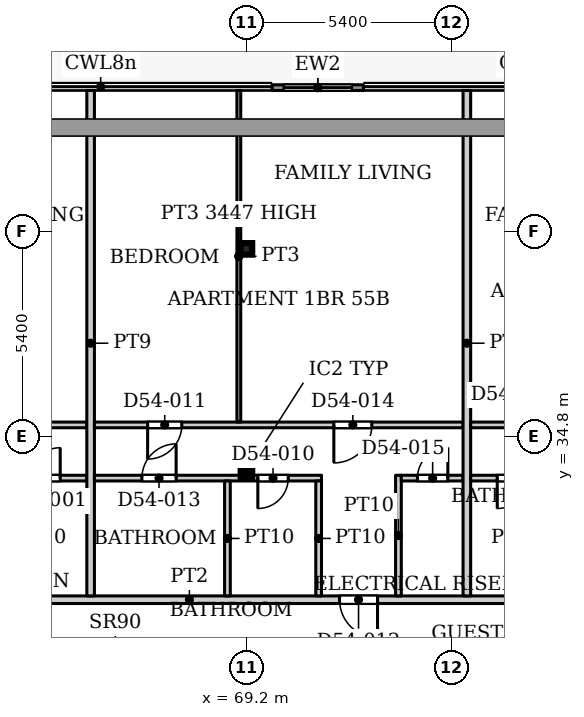
"""IFC4 building model, lengths in metres.
Left out: names, types, materials, properties, quantities, classifications, styles, units other than length and angle.
Written with IfcOpenShell. Run it as: python <this file> out.ifc"""

import sys

from ifc_helpers import new_model, si_unit, direction, frame, frame_2d, origin, origin_2d, place, context, subcontext, project, spatial, rectangle, hollow_rectangle, extrude, source, transform, mapped, element, fill, save


model = new_model("IFC4")
c1 = context("Model", 3, precision=1e-05, world=origin(), true_north=direction((0.0, 1.0)))
c2 = subcontext(c1, "Body", "Model", "MODEL_VIEW")
j1 = project(units=[si_unit("LENGTHUNIT", "METRE"), si_unit("PLANEANGLEUNIT", "RADIAN")], contexts=[c1])
p1 = place(None, origin())
s1 = spatial("IfcSite", under=j1, at=p1, CompositionType="ELEMENT")
p2 = place(p1, origin())
s2 = spatial("IfcBuilding", under=s1, at=p2, CompositionType="ELEMENT")
p3 = place(p2, frame((0.0, 0.0, 235.7)))
s3 = spatial("IfcBuildingStorey", under=s2, at=p3, CompositionType="ELEMENT", Elevation=235.7)
for number, where, z_axis, x_axis in (
    (1, (69.2, 33.863, 0.0), (0.0, 0.0, 1.0), (1.0, 0.0, 0.0)),
    (2, (69.2, 39.732, 0.0), (0.0, 0.0, 1.0), (1.0, 0.0, 0.0)),
):
    element("IfcColumn", number, at=place(p3, frame(where, z_axis=z_axis, x_axis=x_axis)), inside=s3, PredefinedType="COLUMN", context=c2, shape_type="SweptSolid", body=[
        extrude(hollow_rectangle(XDim=0.305, YDim=0.305, WallThickness=0.016, InnerFilletRadius=0.016, OuterFilletRadius=0.032, at=origin_2d()), origin(), (0.0, 0.0, 1.0), 3.9),
    ])
p4 = place(p3, frame((69.877, 43.975, 0.0), z_axis=(0.0, 0.0, 1.0), x_axis=(1.0, 0.0, 0.0)))
e3 = element("IfcWall", 3, at=p4, inside=s3, PredefinedType="SOLIDWALL", context=c2, shape_type="SweptSolid", body=[
    extrude(rectangle(XDim=2.4, YDim=0.15, at=frame_2d((1.2, 0.0))), origin(), (0.0, 0.0, 1.0), 3.75),
])
p5 = place(p4, frame((0.3, 0.0, 0.0)))
e4 = element("IfcOpeningElement", 4, at=p5, cuts=e3, PredefinedType="OPENING", context=c2, shape_type="SweptSolid", body=[
    extrude(rectangle(XDim=1.8, YDim=2.4, at=frame_2d((0.9, 1.2))), frame((0.0, 0.085, 0.0), z_axis=(0.0, -1.0, 0.0), x_axis=(1.0, 0.0, 0.0)), (0.0, 0.0, 1.0), 0.17),
])
p6 = place(p3, frame((53.499, 30.5, 0.0), z_axis=(0.0, 0.0, 1.0), x_axis=(1.0, 0.0, 0.0)))
e5 = element("IfcWall", 5, at=p6, inside=s3, PredefinedType="PARTITIONING", context=c2, shape_type="SweptSolid", body=[
    extrude(rectangle(XDim=28.401, YDim=0.2, at=frame_2d((14.2, 0.0))), origin(), (0.0, 0.0, 1.0), 3.6),
])
p7 = place(p6, frame((0.301, 0.0, 0.0)))
e6 = element("IfcOpeningElement", 6, at=p7, cuts=e5, PredefinedType="OPENING", context=c2, shape_type="SweptSolid", body=[
    extrude(rectangle(XDim=1.0, YDim=2.1, at=frame_2d((0.5, 1.05))), frame((0.0, 0.11, 0.0), z_axis=(0.0, -1.0, 0.0), x_axis=(1.0, 0.0, 0.0)), (0.0, 0.0, 1.0), 0.22),
])
p8 = place(p6, frame((18.151, 0.0, 0.0)))
e7 = element("IfcOpeningElement", 7, at=p8, cuts=e5, PredefinedType="OPENING", context=c2, shape_type="SweptSolid", body=[
    extrude(rectangle(XDim=1.0, YDim=2.1, at=frame_2d((0.5, 1.05))), frame((0.0, 0.11, 0.0), z_axis=(0.0, -1.0, 0.0), x_axis=(1.0, 0.0, 0.0)), (0.0, 0.0, 1.0), 0.22),
])
p9 = place(p6, frame((25.801, 0.0, 0.0)))
e8 = element("IfcOpeningElement", 8, at=p9, cuts=e5, PredefinedType="OPENING", context=c2, shape_type="SweptSolid", body=[
    extrude(rectangle(XDim=1.0, YDim=2.1, at=frame_2d((0.5, 1.05))), frame((0.0, 0.11, 0.0), z_axis=(0.0, -1.0, 0.0), x_axis=(1.0, 0.0, 0.0)), (0.0, 0.0, 1.0), 0.22),
])
p10 = place(p3, frame((53.499, 35.1, 0.0), z_axis=(0.0, 0.0, 1.0), x_axis=(1.0, 0.0, 0.0)))
e9 = element("IfcWall", 9, at=p10, inside=s3, PredefinedType="PARTITIONING", context=c2, shape_type="SweptSolid", body=[
    extrude(rectangle(XDim=11.501, YDim=0.15, at=frame_2d((5.75, 0.0))), origin(), (0.0, 0.0, 1.0), 3.6),
])
p11 = place(p10, frame((5.001, 0.0, 0.0)))
e10 = element("IfcOpeningElement", 10, at=p11, cuts=e9, PredefinedType="OPENING", context=c2, shape_type="SweptSolid", body=[
    extrude(rectangle(XDim=0.9, YDim=2.1, at=frame_2d((0.45, 1.05))), frame((0.0, 0.085, 0.0), z_axis=(0.0, -1.0, 0.0), x_axis=(1.0, 0.0, 0.0)), (0.0, 0.0, 1.0), 0.17),
])
p12 = place(p10, frame((8.851, 0.0, 0.0)))
e11 = element("IfcOpeningElement", 11, at=p12, cuts=e9, PredefinedType="OPENING", context=c2, shape_type="SweptSolid", body=[
    extrude(rectangle(XDim=1.0, YDim=2.1, at=frame_2d((0.5, 1.05))), frame((0.0, 0.085, 0.0), z_axis=(0.0, -1.0, 0.0), x_axis=(1.0, 0.0, 0.0)), (0.0, 0.0, 1.0), 0.17),
])
p13 = place(p10, frame((0.351, 0.0, 0.0)))
e12 = element("IfcOpeningElement", 12, at=p13, cuts=e9, PredefinedType="OPENING", context=c2, shape_type="SweptSolid", body=[
    extrude(rectangle(XDim=0.9, YDim=2.1, at=frame_2d((0.45, 1.05))), frame((0.0, 0.085, 0.0), z_axis=(0.0, -1.0, 0.0), x_axis=(1.0, 0.0, 0.0)), (0.0, 0.0, 1.0), 0.17),
])
p14 = place(p3, frame((55.125, 33.7, 0.0), z_axis=(0.0, 0.0, 1.0), x_axis=(1.0, 0.0, 0.0)))
e13 = element("IfcWall", 13, at=p14, inside=s3, PredefinedType="PARTITIONING", context=c2, shape_type="SweptSolid", body=[
    extrude(rectangle(XDim=9.875, YDim=0.15, at=frame_2d((4.938, 0.0))), origin(), (0.0, 0.0, 1.0), 3.6),
])
p15 = place(p14, frame((8.375, 0.0, 0.0)))
e14 = element("IfcOpeningElement", 14, at=p15, cuts=e13, PredefinedType="OPENING", context=c2, shape_type="SweptSolid", body=[
    extrude(rectangle(XDim=0.8, YDim=2.1, at=frame_2d((0.4, 1.05))), frame((0.0, 0.085, 0.0), z_axis=(0.0, -1.0, 0.0), x_axis=(1.0, 0.0, 0.0)), (0.0, 0.0, 1.0), 0.17),
])
p16 = place(p14, frame((5.975, 0.0, 0.0)))
e15 = element("IfcOpeningElement", 15, at=p16, cuts=e13, PredefinedType="OPENING", context=c2, shape_type="SweptSolid", body=[
    extrude(rectangle(XDim=0.8, YDim=2.1, at=frame_2d((0.4, 1.05))), frame((0.0, 0.085, 0.0), z_axis=(0.0, -1.0, 0.0), x_axis=(1.0, 0.0, 0.0)), (0.0, 0.0, 1.0), 0.17),
])
p17 = place(p14, frame((3.075, 0.0, 0.0)))
e16 = element("IfcOpeningElement", 16, at=p17, cuts=e13, PredefinedType="OPENING", context=c2, shape_type="SweptSolid", body=[
    extrude(rectangle(XDim=0.9, YDim=2.1, at=frame_2d((0.45, 1.05))), frame((0.0, 0.085, 0.0), z_axis=(0.0, -1.0, 0.0), x_axis=(1.0, 0.0, 0.0)), (0.0, 0.0, 1.0), 0.17),
])
p18 = place(p14, frame((0.575, 0.0, 0.0)))
e17 = element("IfcOpeningElement", 17, at=p18, cuts=e13, PredefinedType="OPENING", context=c2, shape_type="SweptSolid", body=[
    extrude(rectangle(XDim=0.8, YDim=2.1, at=frame_2d((0.4, 1.05))), frame((0.0, 0.085, 0.0), z_axis=(0.0, -1.0, 0.0), x_axis=(1.0, 0.0, 0.0)), (0.0, 0.0, 1.0), 0.17),
])
p19 = place(p3, frame((65.1, 30.6, 0.0), z_axis=(0.0, 0.0, 1.0), x_axis=(0.0, 1.0, 0.0)))
e18 = element("IfcWall", 18, at=p19, inside=s3, PredefinedType="PARTITIONING", context=c2, shape_type="SweptSolid", body=[
    extrude(rectangle(XDim=13.3, YDim=0.2, at=frame_2d((6.65, 0.0))), origin(), (0.0, 0.0, 1.0), 3.6),
])
p20 = place(p3, frame((65.2, 33.7, 0.0), z_axis=(0.0, 0.0, 1.0), x_axis=(1.0, 0.0, 0.0)))
e19 = element("IfcWall", 19, at=p20, inside=s3, PredefinedType="PARTITIONING", context=c2, shape_type="SweptSolid", body=[
    extrude(rectangle(XDim=5.975, YDim=0.15, at=frame_2d((2.988, 0.0))), origin(), (0.0, 0.0, 1.0), 3.6),
])
p21 = place(p20, frame((4.3, 0.0, 0.0)))
e20 = element("IfcOpeningElement", 20, at=p21, cuts=e19, PredefinedType="OPENING", context=c2, shape_type="SweptSolid", body=[
    extrude(rectangle(XDim=0.8, YDim=2.1, at=frame_2d((0.4, 1.05))), frame((0.0, 0.085, 0.0), z_axis=(0.0, -1.0, 0.0), x_axis=(1.0, 0.0, 0.0)), (0.0, 0.0, 1.0), 0.17),
])
p22 = place(p20, frame((1.25, 0.0, 0.0)))
e21 = element("IfcOpeningElement", 21, at=p22, cuts=e19, PredefinedType="OPENING", context=c2, shape_type="SweptSolid", body=[
    extrude(rectangle(XDim=0.9, YDim=2.1, at=frame_2d((0.45, 1.05))), frame((0.0, 0.085, 0.0), z_axis=(0.0, -1.0, 0.0), x_axis=(1.0, 0.0, 0.0)), (0.0, 0.0, 1.0), 0.17),
])
p23 = place(p3, frame((65.2, 35.1, 0.0), z_axis=(0.0, 0.0, 1.0), x_axis=(1.0, 0.0, 0.0)))
e22 = element("IfcWall", 22, at=p23, inside=s3, PredefinedType="PARTITIONING", context=c2, shape_type="SweptSolid", body=[
    extrude(rectangle(XDim=9.7, YDim=0.15, at=frame_2d((4.85, 0.0))), origin(), (0.0, 0.0, 1.0), 3.6),
])
p24 = place(p23, frame((1.4, 0.0, 0.0)))
e23 = element("IfcOpeningElement", 23, at=p24, cuts=e22, PredefinedType="OPENING", context=c2, shape_type="SweptSolid", body=[
    extrude(rectangle(XDim=0.9, YDim=2.1, at=frame_2d((0.45, 1.05))), frame((0.0, 0.085, 0.0), z_axis=(0.0, -1.0, 0.0), x_axis=(1.0, 0.0, 0.0)), (0.0, 0.0, 1.0), 0.17),
])
p25 = place(p23, frame((6.3, 0.0, 0.0)))
e24 = element("IfcOpeningElement", 24, at=p25, cuts=e22, PredefinedType="OPENING", context=c2, shape_type="SweptSolid", body=[
    extrude(rectangle(XDim=1.0, YDim=2.1, at=frame_2d((0.5, 1.05))), frame((0.0, 0.085, 0.0), z_axis=(0.0, -1.0, 0.0), x_axis=(1.0, 0.0, 0.0)), (0.0, 0.0, 1.0), 0.17),
])
p26 = place(p3, frame((68.7, 30.6, 0.0), z_axis=(0.0, 0.0, 1.0), x_axis=(0.0, 1.0, 0.0)))
e25 = element("IfcWall", 25, at=p26, inside=s3, PredefinedType="PARTITIONING", context=c2, shape_type="SweptSolid", body=[
    extrude(rectangle(XDim=3.025, YDim=0.15, at=frame_2d((1.512, 0.0))), origin(), (0.0, 0.0, 1.0), 3.6),
])
p27 = place(p3, frame((69.0, 35.175, 0.0), z_axis=(0.0, 0.0, 1.0), x_axis=(0.0, 1.0, 0.0)))
e26 = element("IfcWall", 26, at=p27, inside=s3, PredefinedType="PARTITIONING", context=c2, shape_type="SweptSolid", body=[
    extrude(rectangle(XDim=8.725, YDim=0.1, at=frame_2d((4.362, 0.0))), origin(), (0.0, 0.0, 1.0), 3.447),
])
p28 = place(p3, frame((71.1, 30.6, 0.0), z_axis=(0.0, 0.0, 1.0), x_axis=(0.0, 1.0, 0.0)))
e27 = element("IfcWall", 27, at=p28, inside=s3, PredefinedType="PARTITIONING", context=c2, shape_type="SweptSolid", body=[
    extrude(rectangle(XDim=3.025, YDim=0.15, at=frame_2d((1.512, 0.0))), origin(), (0.0, 0.0, 1.0), 3.6),
])
p29 = place(p3, frame((73.2, 30.6, 0.0), z_axis=(0.0, 0.0, 1.0), x_axis=(0.0, 1.0, 0.0)))
e28 = element("IfcWall", 28, at=p29, inside=s3, PredefinedType="PARTITIONING", context=c2, shape_type="SweptSolid", body=[
    extrude(rectangle(XDim=3.175, YDim=0.15, at=frame_2d((1.587, 0.0))), origin(), (0.0, 0.0, 1.0), 3.6),
])
p30 = place(p3, frame((73.275, 33.7, 0.0), z_axis=(0.0, 0.0, 1.0), x_axis=(1.0, 0.0, 0.0)))
e29 = element("IfcWall", 29, at=p30, inside=s3, PredefinedType="PARTITIONING", context=c2, shape_type="SweptSolid", body=[
    extrude(rectangle(XDim=1.625, YDim=0.15, at=frame_2d((0.812, 0.0))), origin(), (0.0, 0.0, 1.0), 3.6),
])
p31 = place(p30, frame((0.425, 0.0, 0.0)))
e30 = element("IfcOpeningElement", 30, at=p31, cuts=e29, PredefinedType="OPENING", context=c2, shape_type="SweptSolid", body=[
    extrude(rectangle(XDim=0.8, YDim=2.1, at=frame_2d((0.4, 1.05))), frame((0.0, 0.085, 0.0), z_axis=(0.0, -1.0, 0.0), x_axis=(1.0, 0.0, 0.0)), (0.0, 0.0, 1.0), 0.17),
])
p32 = place(p3, frame((75.0, 30.6, 0.0), z_axis=(0.0, 0.0, 1.0), x_axis=(0.0, 1.0, 0.0)))
e31 = element("IfcWall", 31, at=p32, inside=s3, PredefinedType="PARTITIONING", context=c2, shape_type="SweptSolid", body=[
    extrude(rectangle(XDim=13.3, YDim=0.2, at=frame_2d((6.65, 0.0))), origin(), (0.0, 0.0, 1.0), 3.6),
])
p33 = place(p3, frame((75.1, 33.7, 0.0), z_axis=(0.0, 0.0, 1.0), x_axis=(1.0, 0.0, 0.0)))
e32 = element("IfcWall", 32, at=p33, inside=s3, PredefinedType="PARTITIONING", context=c2, shape_type="SweptSolid", body=[
    extrude(rectangle(XDim=3.875, YDim=0.15, at=frame_2d((1.938, 0.0))), origin(), (0.0, 0.0, 1.0), 3.6),
])
p34 = place(p33, frame((0.7, 0.0, 0.0)))
e33 = element("IfcOpeningElement", 33, at=p34, cuts=e32, PredefinedType="OPENING", context=c2, shape_type="SweptSolid", body=[
    extrude(rectangle(XDim=0.8, YDim=2.1, at=frame_2d((0.4, 1.05))), frame((0.0, 0.085, 0.0), z_axis=(0.0, -1.0, 0.0), x_axis=(1.0, 0.0, 0.0)), (0.0, 0.0, 1.0), 0.17),
])
p35 = place(p33, frame((2.65, 0.0, 0.0)))
e34 = element("IfcOpeningElement", 34, at=p35, cuts=e32, PredefinedType="OPENING", context=c2, shape_type="SweptSolid", body=[
    extrude(rectangle(XDim=0.8, YDim=2.1, at=frame_2d((0.4, 1.05))), frame((0.0, 0.085, 0.0), z_axis=(0.0, -1.0, 0.0), x_axis=(1.0, 0.0, 0.0)), (0.0, 0.0, 1.0), 0.17),
])
p36 = place(p3, frame((75.1, 35.1, 0.0), z_axis=(0.0, 0.0, 1.0), x_axis=(1.0, 0.0, 0.0)))
e35 = element("IfcWall", 35, at=p36, inside=s3, PredefinedType="PARTITIONING", context=c2, shape_type="SweptSolid", body=[
    extrude(rectangle(XDim=8.6, YDim=0.15, at=frame_2d((4.3, 0.0))), origin(), (0.0, 0.0, 1.0), 3.6),
])
p37 = place(p36, frame((6.35, 0.0, 0.0)))
e36 = element("IfcOpeningElement", 36, at=p37, cuts=e35, PredefinedType="OPENING", context=c2, shape_type="SweptSolid", body=[
    extrude(rectangle(XDim=0.9, YDim=2.1, at=frame_2d((0.45, 1.05))), frame((0.0, 0.085, 0.0), z_axis=(0.0, -1.0, 0.0), x_axis=(1.0, 0.0, 0.0)), (0.0, 0.0, 1.0), 0.17),
])
p38 = place(p36, frame((1.95, 0.0, 0.0)))
e37 = element("IfcOpeningElement", 37, at=p38, cuts=e35, PredefinedType="OPENING", context=c2, shape_type="SweptSolid", body=[
    extrude(rectangle(XDim=1.0, YDim=2.1, at=frame_2d((0.5, 1.05))), frame((0.0, 0.085, 0.0), z_axis=(0.0, -1.0, 0.0), x_axis=(1.0, 0.0, 0.0)), (0.0, 0.0, 1.0), 0.17),
])
m1 = source(origin(), c2, "Body", "SweptSolid", [
    extrude(rectangle(XDim=1.8, YDim=2.4, at=frame_2d((0.9, 1.2))), frame((0.0, 0.025, 0.0), z_axis=(0.0, -1.0, 0.0), x_axis=(1.0, 0.0, 0.0)), (0.0, 0.0, 1.0), 0.05),
])
p39 = place(p5, origin())
e38 = element("IfcDoor", 38, at=p39, inside=s3, OperationType="SLIDING_TO_LEFT", PredefinedType="DOOR", context=c2, shape_type="MappedRepresentation", body=[
    mapped(m1, transform((0.0, 0.0, 0.0), x_axis=(1.0, 0.0, 0.0), y_axis=(0.0, 1.0, 0.0), z_axis=(0.0, 0.0, 1.0), scale=1.0)),
])
fill(e4, e38)
m2 = source(origin(), c2, "Body", "SweptSolid", [
    extrude(rectangle(XDim=0.8, YDim=2.1, at=frame_2d((0.4, 1.05))), frame((0.0, 0.025, 0.0), z_axis=(0.0, -1.0, 0.0), x_axis=(1.0, 0.0, 0.0)), (0.0, 0.0, 1.0), 0.05),
])
p40 = place(p15, origin())
e39 = element("IfcDoor", 39, at=p40, inside=s3, OperationType="SINGLE_SWING_LEFT", PredefinedType="DOOR", context=c2, shape_type="MappedRepresentation", body=[
    mapped(m2, transform((0.0, 0.0, 0.0), x_axis=(1.0, 0.0, 0.0), y_axis=(0.0, 1.0, 0.0), z_axis=(0.0, 0.0, 1.0), scale=1.0)),
])
fill(e14, e39)
p41 = place(p21, origin())
e40 = element("IfcDoor", 40, at=p41, inside=s3, OperationType="SINGLE_SWING_RIGHT", PredefinedType="DOOR", context=c2, shape_type="MappedRepresentation", body=[
    mapped(m2, transform((0.0, 0.0, 0.0), x_axis=(1.0, 0.0, 0.0), y_axis=(0.0, 1.0, 0.0), z_axis=(0.0, 0.0, 1.0), scale=1.0)),
])
fill(e20, e40)
m3 = source(origin(), c2, "Body", "SweptSolid", [
    extrude(rectangle(XDim=0.9, YDim=2.1, at=frame_2d((0.45, 1.05))), frame((0.0, 0.025, 0.0), z_axis=(0.0, -1.0, 0.0), x_axis=(1.0, 0.0, 0.0)), (0.0, 0.0, 1.0), 0.05),
])
p42 = place(p24, origin())
e41 = element("IfcDoor", 41, at=p42, inside=s3, OperationType="SINGLE_SWING_RIGHT", PredefinedType="DOOR", context=c2, shape_type="MappedRepresentation", body=[
    mapped(m3, transform((0.0, 0.0, 0.0), x_axis=(1.0, 0.0, 0.0), y_axis=(0.0, 1.0, 0.0), z_axis=(0.0, 0.0, 1.0), scale=1.0)),
])
fill(e23, e41)
m4 = source(origin(), c2, "Body", "SweptSolid", [
    extrude(rectangle(XDim=1.0, YDim=2.1, at=frame_2d((0.5, 1.05))), frame((0.0, 0.025, 0.0), z_axis=(0.0, -1.0, 0.0), x_axis=(1.0, 0.0, 0.0)), (0.0, 0.0, 1.0), 0.05),
])
p43 = place(p8, origin())
e42 = element("IfcDoor", 42, at=p43, inside=s3, OperationType="SINGLE_SWING_RIGHT", PredefinedType="DOOR", context=c2, shape_type="MappedRepresentation", body=[
    mapped(m4, transform((0.0, 0.0, 0.0), x_axis=(1.0, 0.0, 0.0), y_axis=(0.0, 1.0, 0.0), z_axis=(0.0, 0.0, 1.0), scale=1.0)),
])
fill(e7, e42)
p44 = place(p22, origin())
e43 = element("IfcDoor", 43, at=p44, inside=s3, OperationType="SINGLE_SWING_LEFT", PredefinedType="DOOR", context=c2, shape_type="MappedRepresentation", body=[
    mapped(m3, transform((0.0, 0.0, 0.0), x_axis=(1.0, 0.0, 0.0), y_axis=(0.0, 1.0, 0.0), z_axis=(0.0, 0.0, 1.0), scale=1.0)),
])
fill(e21, e43)
m5 = source(origin(), c2, "Body", "SweptSolid", [
    extrude(rectangle(XDim=1.0, YDim=2.1, at=frame_2d((0.5, 1.05))), frame((0.0, 0.025, 0.0), z_axis=(0.0, -1.0, 0.0), x_axis=(1.0, 0.0, 0.0)), (0.0, 0.0, 1.0), 0.05),
])
p45 = place(p25, origin())
e44 = element("IfcDoor", 44, at=p45, inside=s3, OperationType="SINGLE_SWING_RIGHT", PredefinedType="DOOR", context=c2, shape_type="MappedRepresentation", body=[
    mapped(m5, transform((0.0, 0.0, 0.0), x_axis=(1.0, 0.0, 0.0), y_axis=(0.0, 1.0, 0.0), z_axis=(0.0, 0.0, 1.0), scale=1.0)),
])
fill(e24, e44)
p46 = place(p31, origin())
e45 = element("IfcDoor", 45, at=p46, inside=s3, OperationType="SINGLE_SWING_LEFT", PredefinedType="DOOR", context=c2, shape_type="MappedRepresentation", body=[
    mapped(m2, transform((0.0, 0.0, 0.0), x_axis=(1.0, 0.0, 0.0), y_axis=(0.0, 1.0, 0.0), z_axis=(0.0, 0.0, 1.0), scale=1.0)),
])
fill(e30, e45)
p47 = place(p34, origin())
e46 = element("IfcDoor", 46, at=p47, inside=s3, OperationType="SINGLE_SWING_RIGHT", PredefinedType="DOOR", context=c2, shape_type="MappedRepresentation", body=[
    mapped(m2, transform((0.0, 0.0, 0.0), x_axis=(1.0, 0.0, 0.0), y_axis=(0.0, 1.0, 0.0), z_axis=(0.0, 0.0, 1.0), scale=1.0)),
])
fill(e33, e46)
save(model, sys.argv[1])
